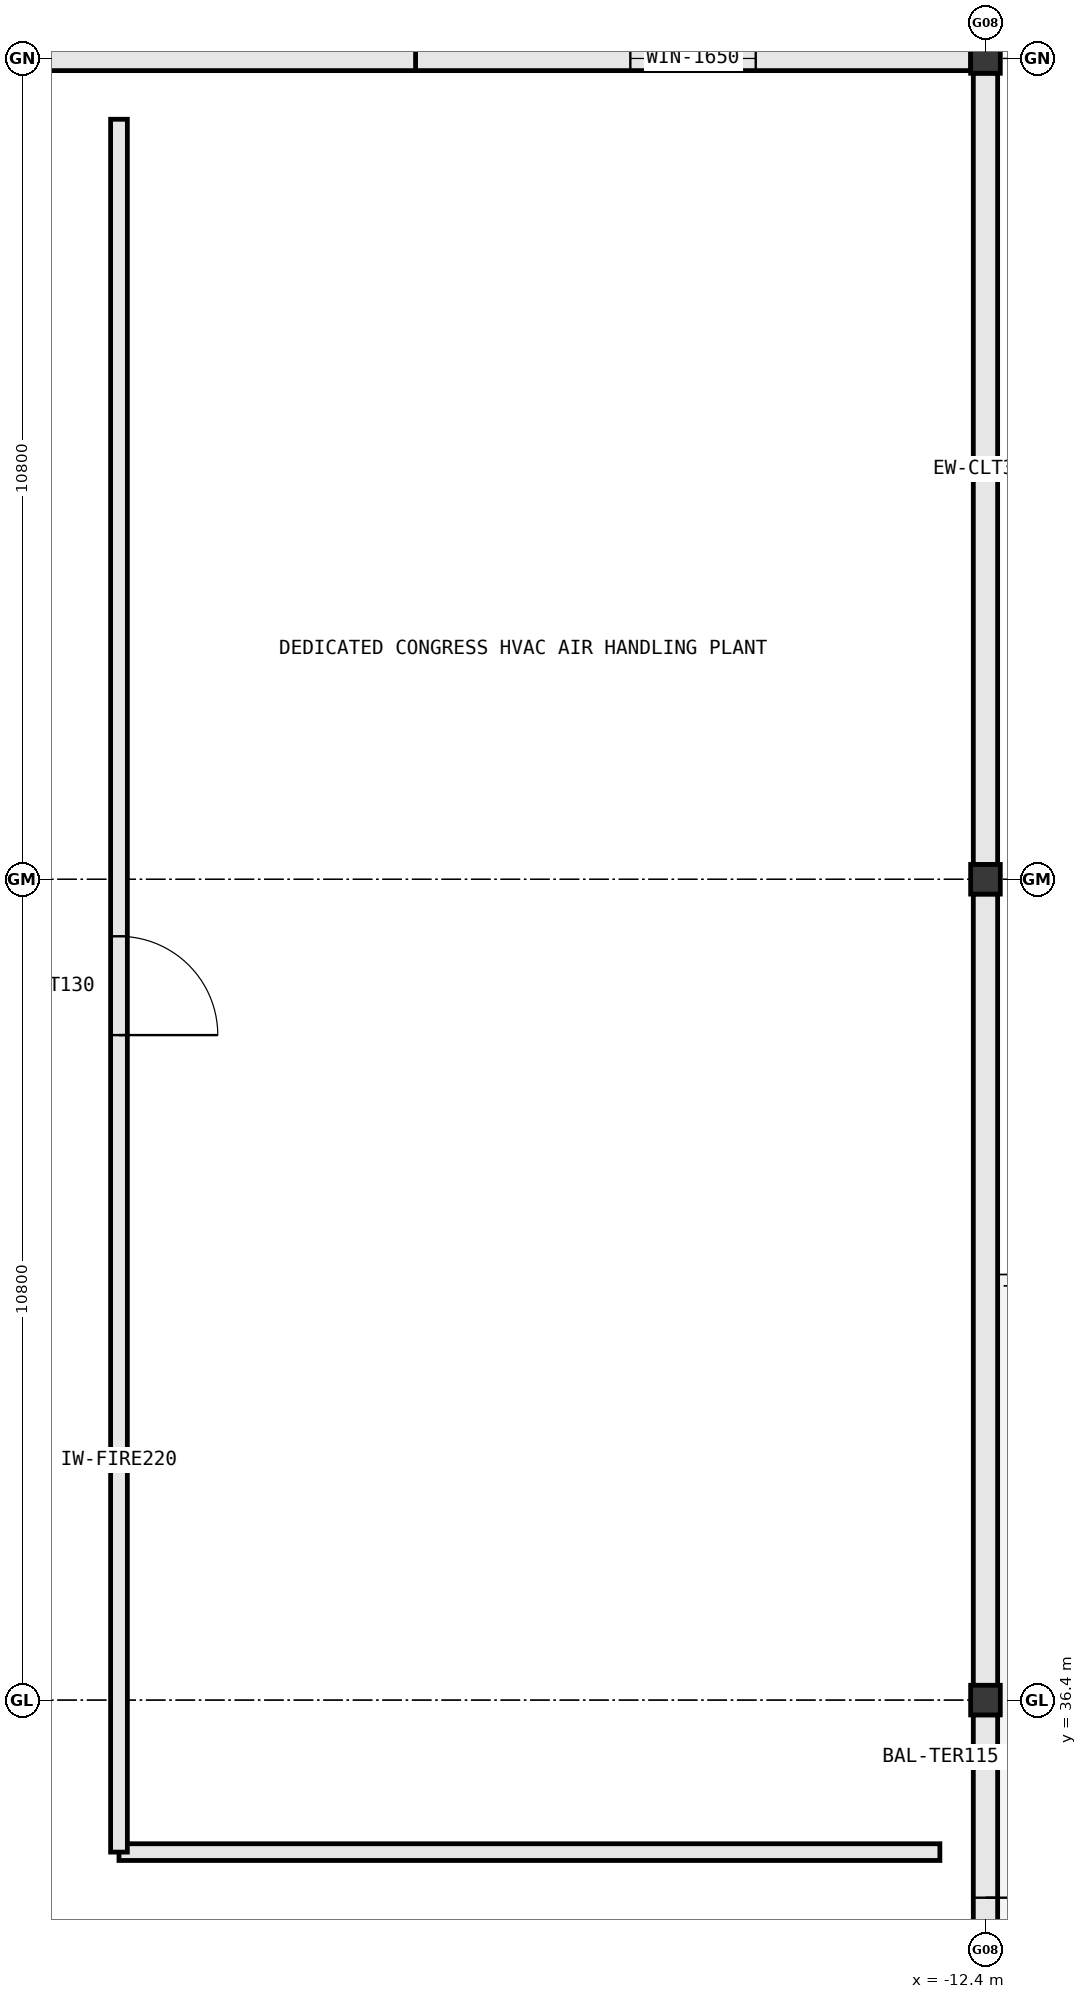
"""IFC4 building model, lengths in metres.
Left out: names, types, materials, properties, quantities, classifications, styles, units other than length and angle.
Written with IfcOpenShell. Run it as: python <this file> out.ifc"""

import sys

from ifc_helpers import new_model, si_unit, direction, frame, frame_2d, origin, origin_2d, place, context, subcontext, project, spatial, rectangle, extrude, element, fill, save


model = new_model("IFC4")
c1 = context("Model", 3, precision=1e-05, world=origin(), true_north=direction((0.0, 1.0)))
c2 = subcontext(c1, "Body", "Model", "MODEL_VIEW")
j1 = project(units=[si_unit("LENGTHUNIT", "METRE"), si_unit("PLANEANGLEUNIT", "RADIAN")], contexts=[c1])
p1 = place(None, origin())
s1 = spatial("IfcSite", under=j1, at=p1, CompositionType="ELEMENT")
p2 = place(p1, origin())
s2 = spatial("IfcBuilding", under=s1, at=p2, CompositionType="ELEMENT")
p3 = place(p2, frame((0.0, 0.0, 16.2)))
s3 = spatial("IfcBuildingStorey", under=s2, at=p3, CompositionType="ELEMENT", Elevation=16.2)
for number, where, z_axis, x_axis in (
    (1, (-12.4, 36.4, 0.0), (0.0, 0.0, 1.0), (1.0, 0.0, 0.0)),
    (2, (-12.4, 47.2, 0.0), (0.0, 0.0, 1.0), (1.0, 0.0, 0.0)),
    (3, (-12.4, 58.0, 0.0), (0.0, 0.0, 1.0), (1.0, 0.0, 0.0)),
):
    element("IfcColumn", number, at=place(p3, frame(where, z_axis=z_axis, x_axis=x_axis)), inside=s3, PredefinedType="COLUMN", context=c2, shape_type="SweptSolid", body=[
        extrude(rectangle(XDim=0.39, YDim=0.39, at=origin_2d()), origin(), (0.0, 0.0, 1.0), 3.8),
    ])
p4 = place(p3, frame((-12.4, 27.195, 0.0), z_axis=(0.0, 0.0, 1.0), x_axis=(0.0, 1.0, 0.0)))
e4 = element("IfcWall", 4, at=p4, inside=s3, PredefinedType="STANDARD", context=c2, shape_type="SweptSolid", body=[
    extrude(rectangle(XDim=9.012, YDim=0.32, at=frame_2d((4.506, 0.0))), origin(), (0.0, 0.0, 1.0), 3.56),
])
p5 = place(p4, frame((5.006, 0.0, 0.0)))
e5 = element("IfcOpeningElement", 5, at=p5, cuts=e4, PredefinedType="OPENING", context=c2, shape_type="SweptSolid", body=[
    extrude(rectangle(XDim=1.6, YDim=2.25, at=frame_2d((0.8, 1.125))), frame((0.0, 0.172, 0.0), z_axis=(0.0, -1.0, 0.0), x_axis=(1.0, 0.0, 0.0)), (0.0, 0.0, 1.0), 0.344),
])
p6 = place(p3, frame((-12.4, 36.593, 0.0), z_axis=(0.0, 0.0, 1.0), x_axis=(0.0, 1.0, 0.0)))
e6 = element("IfcWall", 6, at=p6, inside=s3, PredefinedType="STANDARD", context=c2, shape_type="SweptSolid", body=[
    extrude(rectangle(XDim=10.414, YDim=0.32, at=frame_2d((5.207, 0.0))), origin(), (0.0, 0.0, 1.0), 2.915),
])
p7 = place(p3, frame((-12.4, 47.393, 0.0), z_axis=(0.0, 0.0, 1.0), x_axis=(0.0, 1.0, 0.0)))
e7 = element("IfcWall", 7, at=p7, inside=s3, PredefinedType="STANDARD", context=c2, shape_type="SweptSolid", body=[
    extrude(rectangle(XDim=10.414, YDim=0.32, at=frame_2d((5.207, 0.0))), origin(), (0.0, 0.0, 1.0), 2.915),
])
p8 = place(p3, frame((-12.593, 58.0, 0.0), z_axis=(0.0, 0.0, 1.0), x_axis=(-1.0, 0.0, 0.0)))
e8 = element("IfcWall", 8, at=p8, inside=s3, PredefinedType="STANDARD", context=c2, shape_type="SweptSolid", body=[
    extrude(rectangle(XDim=7.309, YDim=0.32, at=frame_2d((3.655, 0.0))), origin(), (0.0, 0.0, 1.0), 2.875),
])
p9 = place(p8, frame((2.83, 0.0, 0.85)))
e9 = element("IfcOpeningElement", 9, at=p9, cuts=e8, PredefinedType="OPENING", context=c2, shape_type="SweptSolid", body=[
    extrude(rectangle(XDim=1.65, YDim=1.8, at=frame_2d((0.825, 0.9))), frame((0.0, 0.172, 0.0), z_axis=(0.0, -1.0, 0.0), x_axis=(1.0, 0.0, 0.0)), (0.0, 0.0, 1.0), 0.344),
])
p10 = place(p3, frame((-19.898, 58.0, 0.0), z_axis=(0.0, 0.0, 1.0), x_axis=(-1.0, 0.0, 0.0)))
e10 = element("IfcWall", 10, at=p10, inside=s3, PredefinedType="STANDARD", context=c2, shape_type="SweptSolid", body=[
    extrude(rectangle(XDim=7.309, YDim=0.32, at=frame_2d((3.655, 0.0))), origin(), (0.0, 0.0, 1.0), 2.875),
])
p11 = place(p3, frame((-23.8, 34.4, 0.0), z_axis=(0.0, 0.0, 1.0), x_axis=(1.0, 0.0, 0.0)))
e11 = element("IfcWall", 11, at=p11, inside=s3, PredefinedType="STANDARD", context=c2, shape_type="SweptSolid", body=[
    extrude(rectangle(XDim=10.8, YDim=0.22, at=frame_2d((5.4, 0.0))), origin(), (0.0, 0.0, 1.0), 3.56),
])
p12 = place(p3, frame((-23.8, 57.2, 0.0), z_axis=(0.0, 0.0, 1.0), x_axis=(0.0, -1.0, 0.0)))
e12 = element("IfcWall", 12, at=p12, inside=s3, PredefinedType="STANDARD", context=c2, shape_type="SweptSolid", body=[
    extrude(rectangle(XDim=22.8, YDim=0.22, at=frame_2d((11.4, 0.0))), origin(), (0.0, 0.0, 1.0), 3.56),
])
p13 = place(p12, frame((10.75, 0.0, 0.0)))
e13 = element("IfcOpeningElement", 13, at=p13, cuts=e12, PredefinedType="OPENING", context=c2, shape_type="SweptSolid", body=[
    extrude(rectangle(XDim=1.3, YDim=2.2, at=frame_2d((0.65, 1.1))), frame((0.0, 0.122, 0.0), z_axis=(0.0, -1.0, 0.0), x_axis=(1.0, 0.0, 0.0)), (0.0, 0.0, 1.0), 0.244),
])
p14 = place(p5, frame((1.6, 0.0, 0.0), z_axis=(0.0, 0.0, 1.0), x_axis=(-1.0, 0.0, 0.0)))
e14 = element("IfcDoor", 14, at=p14, inside=s3, OperationType="DOUBLE_DOOR_SINGLE_SWING", PredefinedType="DOOR", context=c2, shape_type="SweptSolid", body=[
    extrude(rectangle(XDim=1.6, YDim=2.25, at=frame_2d((0.8, 1.125))), frame((0.0, 0.025, 0.0), z_axis=(0.0, -1.0, 0.0), x_axis=(1.0, 0.0, 0.0)), (0.0, 0.0, 1.0), 0.05),
])
fill(e5, e14)
p15 = place(p9, origin())
e15 = element("IfcWindow", 15, at=p15, inside=s3, PartitioningType="SINGLE_PANEL", PredefinedType="WINDOW", context=c2, shape_type="SweptSolid", body=[
    extrude(rectangle(XDim=1.65, YDim=1.8, at=frame_2d((0.825, 0.9))), frame((0.0, 0.03, 0.0), z_axis=(0.0, -1.0, 0.0), x_axis=(1.0, 0.0, 0.0)), (0.0, 0.0, 1.0), 0.06),
])
fill(e9, e15)
p16 = place(p13, origin())
e16 = element("IfcDoor", 16, at=p16, inside=s3, OperationType="SINGLE_SWING_RIGHT", PredefinedType="DOOR", context=c2, shape_type="SweptSolid", body=[
    extrude(rectangle(XDim=1.3, YDim=2.2, at=frame_2d((0.65, 1.1))), frame((0.0, 0.025, 0.0), z_axis=(0.0, -1.0, 0.0), x_axis=(1.0, 0.0, 0.0)), (0.0, 0.0, 1.0), 0.05),
])
fill(e13, e16)
save(model, sys.argv[1])
